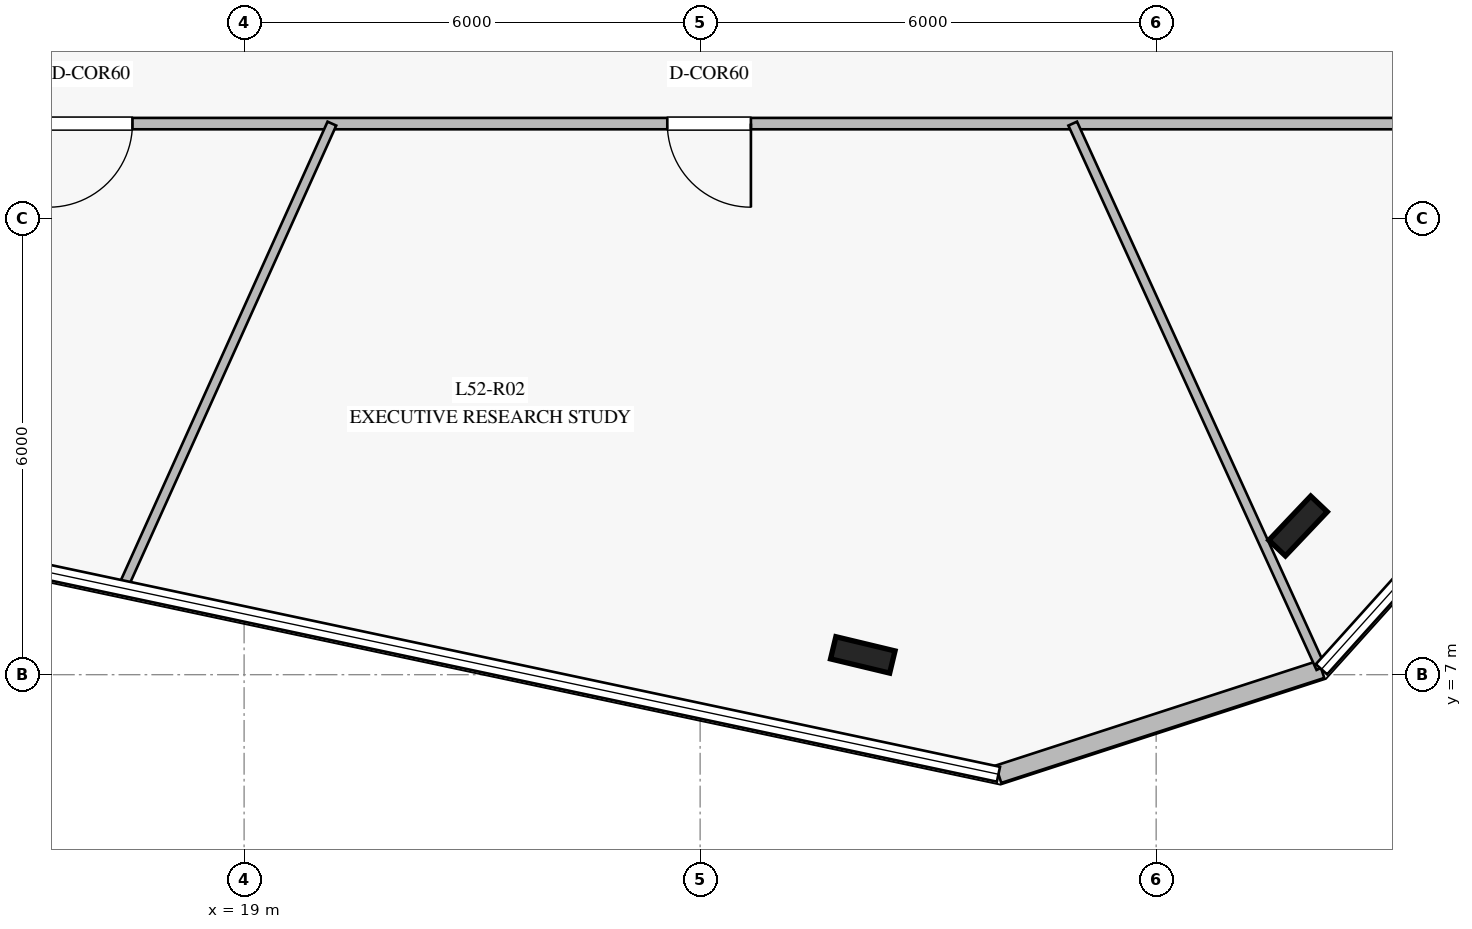
"""IFC4 building model, lengths in metres.
Left out: names, types, materials, properties, quantities, classifications, styles, units other than length and angle.
Written with IfcOpenShell. Run it as: python <this file> out.ifc"""

import sys

from ifc_helpers import new_model, si_unit, direction, frame, frame_2d, origin, origin_2d, place, context, subcontext, project, spatial, rectangle, i_section, extrude, element, fill, save


model = new_model("IFC4")
c1 = context("Model", 3, precision=1e-05, world=origin(), true_north=direction((0.0, 1.0)))
c2 = subcontext(c1, "Body", "Model", "MODEL_VIEW")
j1 = project(units=[si_unit("LENGTHUNIT", "METRE"), si_unit("PLANEANGLEUNIT", "RADIAN")], contexts=[c1])
p1 = place(None, origin())
s1 = spatial("IfcSite", under=j1, at=p1, CompositionType="ELEMENT")
p2 = place(p1, origin())
s2 = spatial("IfcBuilding", under=s1, at=p2, CompositionType="ELEMENT")
p3 = place(p2, frame((0.0, 0.0, 216.8)))
s3 = spatial("IfcBuildingStorey", under=s2, at=p3, CompositionType="ELEMENT", Elevation=216.8)
for number, where, z_axis, x_axis in (
    (1, (27.14, 7.26, 0.0), (0.0, 0.0, 1.0), (-0.972, 0.233, 0.0)),
    (2, (32.867, 8.956, 0.0), (0.0, 0.0, 1.0), (0.688, 0.725, 0.0)),
):
    element("IfcColumn", number, at=place(p3, frame(where, z_axis=z_axis, x_axis=x_axis)), inside=s3, PredefinedType="COLUMN", context=c2, shape_type="SweptSolid", body=[
        extrude(i_section(OverallWidth=0.3, OverallDepth=0.8, WebThickness=0.018, FlangeThickness=0.033, at=origin_2d()), origin(), (0.0, 0.0, 1.0), 4.0),
    ])
p4 = place(p3, frame((28.925, 5.69, 0.0), z_axis=(0.0, 0.0, 1.0), x_axis=(0.95104370386, 0.309056424215, 0.0)))
e3 = element("IfcWall", 3, at=p4, inside=s3, PredefinedType="STANDARD", context=c2, shape_type="SweptSolid", body=[
    extrude(rectangle(XDim=4.469, YDim=0.24, at=frame_2d((2.234, 0.0))), origin(), (0.0, 0.0, 1.0), 3.78),
])
p5 = place(p3, frame((36.35, 14.25, 0.0), z_axis=(0.0, 0.0, 1.0), x_axis=(-1.0, 0.0, 0.0)))
e4 = element("IfcWall", 4, at=p5, inside=s3, PredefinedType="PARTITIONING", context=c2, shape_type="SweptSolid", body=[
    extrude(rectangle(XDim=22.7, YDim=0.15, at=frame_2d((11.35, 0.0))), origin(), (0.0, 0.0, 1.0), 3.05),
])
p6 = place(p5, frame((18.819, 0.0, 0.0)))
e5 = element("IfcOpeningElement", 5, at=p6, cuts=e4, PredefinedType="OPENING", context=c2, shape_type="SweptSolid", body=[
    extrude(rectangle(XDim=1.1, YDim=2.2, at=frame_2d((0.55, 1.1))), frame((0.0, 0.085, 0.0), z_axis=(0.0, -1.0, 0.0), x_axis=(1.0, 0.0, 0.0)), (0.0, 0.0, 1.0), 0.17),
])
p7 = place(p5, frame((10.682, 0.0, 0.0)))
e6 = element("IfcOpeningElement", 6, at=p7, cuts=e4, PredefinedType="OPENING", context=c2, shape_type="SweptSolid", body=[
    extrude(rectangle(XDim=1.1, YDim=2.2, at=frame_2d((0.55, 1.1))), frame((0.0, 0.085, 0.0), z_axis=(0.0, -1.0, 0.0), x_axis=(1.0, 0.0, 0.0)), (0.0, 0.0, 1.0), 0.17),
])
p8 = place(p3, frame((20.155, 14.25, 0.0), z_axis=(0.0, 0.0, 1.0), x_axis=(-0.410903648805, -0.911678776433, 0.0)))
e7 = element("IfcWall", 7, at=p8, inside=s3, PredefinedType="PARTITIONING", context=c2, shape_type="SweptSolid", body=[
    extrude(rectangle(XDim=6.686, YDim=0.125, at=frame_2d((3.343, 0.0))), origin(), (0.0, 0.0, 1.0), 3.05),
])
p9 = place(p3, frame((29.902, 14.25, 0.0), z_axis=(0.0, 0.0, 1.0), x_axis=(0.414791209968, -0.909916618231, 0.0)))
e8 = element("IfcWall", 8, at=p9, inside=s3, PredefinedType="PARTITIONING", context=c2, shape_type="SweptSolid", body=[
    extrude(rectangle(XDim=7.871, YDim=0.125, at=frame_2d((3.936, 0.0))), origin(), (0.0, 0.0, 1.0), 3.18),
])
p10 = place(p6, origin())
e9 = element("IfcDoor", 9, at=p10, inside=s3, OperationType="SINGLE_SWING_RIGHT", PredefinedType="DOOR", context=c2, shape_type="SweptSolid", body=[
    extrude(rectangle(XDim=1.1, YDim=2.2, at=frame_2d((0.55, 1.1))), frame((0.0, 0.025, 0.0), z_axis=(0.0, -1.0, 0.0), x_axis=(1.0, 0.0, 0.0)), (0.0, 0.0, 1.0), 0.05),
])
fill(e5, e9)
p11 = place(p7, origin())
e10 = element("IfcDoor", 10, at=p11, inside=s3, OperationType="SINGLE_SWING_LEFT", PredefinedType="DOOR", context=c2, shape_type="SweptSolid", body=[
    extrude(rectangle(XDim=1.1, YDim=2.2, at=frame_2d((0.55, 1.1))), frame((0.0, 0.025, 0.0), z_axis=(0.0, -1.0, 0.0), x_axis=(1.0, 0.0, 0.0)), (0.0, 0.0, 1.0), 0.05),
])
fill(e6, e10)
save(model, sys.argv[1])
